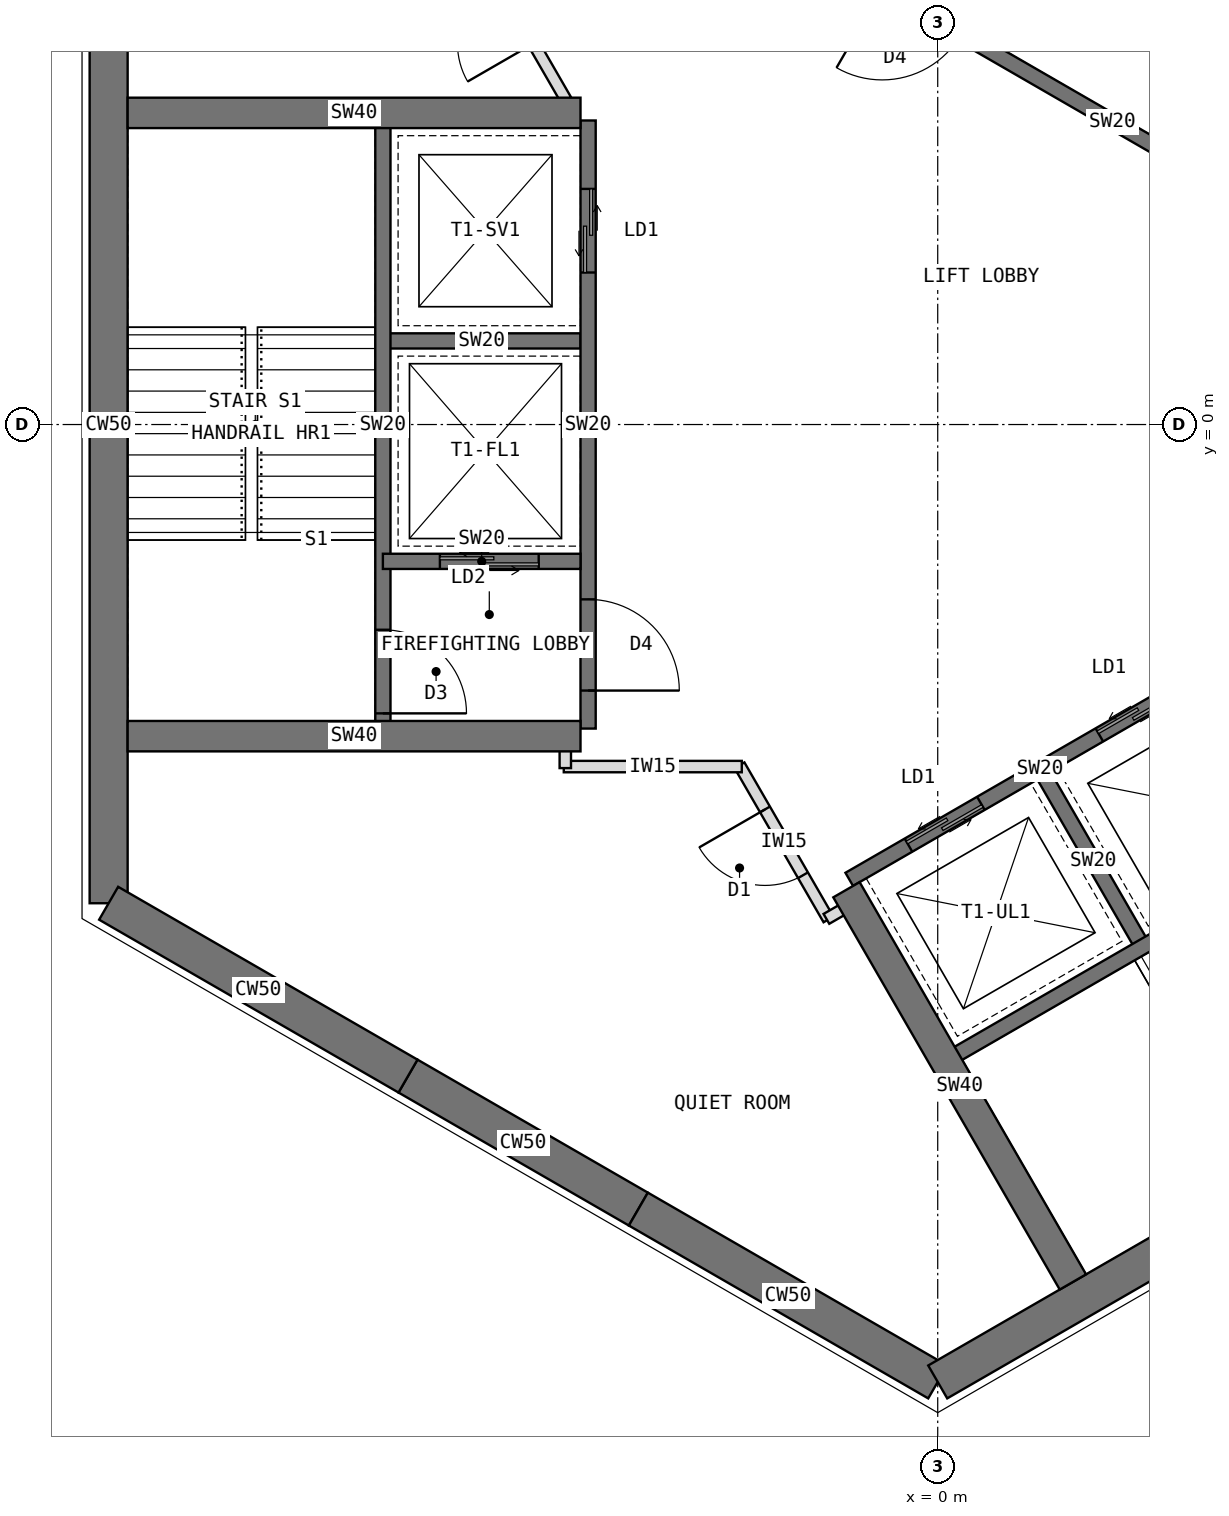
"""IFC4 building model, lengths in metres.
Left out: names, types, materials, properties, quantities, classifications, styles, units other than length and angle.
Written with IfcOpenShell. Run it as: python <this file> out.ifc"""

import sys

from ifc_helpers import new_model, si_unit, direction, frame, frame_2d, origin, place, context, subcontext, project, spatial, rectangle, extrude, element, fill, save


model = new_model("IFC4")
c1 = context("Model", 3, precision=1e-05, world=origin(), true_north=direction((0.0, 1.0)))
c2 = subcontext(c1, "Body", "Model", "MODEL_VIEW")
j1 = project(units=[si_unit("LENGTHUNIT", "METRE"), si_unit("PLANEANGLEUNIT", "RADIAN")], contexts=[c1])
p1 = place(None, origin())
s1 = spatial("IfcSite", under=j1, at=p1, CompositionType="ELEMENT")
p2 = place(p1, origin())
s2 = spatial("IfcBuilding", under=s1, at=p2, CompositionType="ELEMENT")
p3 = place(p2, frame((0.0, 0.0, 230.5)))
s3 = spatial("IfcBuildingStorey", under=s2, at=p3, CompositionType="ELEMENT", Elevation=230.5)
p4 = place(p3, frame((-10.908, 6.298, 0.0), z_axis=(0.0, 0.0, 1.0), x_axis=(0.0, -1.0, 0.0)))
e1 = element("IfcWall", 1, at=p4, inside=s3, PredefinedType="SHEAR", context=c2, shape_type="SweptSolid", body=[
    extrude(rectangle(XDim=12.596, YDim=0.5, at=frame_2d((6.298, 0.0))), origin(), (0.0, 0.0, 1.0), 4.0),
])
p5 = place(p3, frame((-10.908, -6.298, 0.0), z_axis=(0.0, 0.0, 1.0), x_axis=(0.866034513004, -0.499984222037, 0.0)))
e2 = element("IfcWall", 2, at=p5, inside=s3, PredefinedType="SHEAR", context=c2, shape_type="SweptSolid", body=[
    extrude(rectangle(XDim=4.548, YDim=0.5, at=frame_2d((2.274, 0.0))), origin(), (0.0, 0.0, 1.0), 4.0),
])
p6 = place(p3, frame((-6.97, -8.572, 0.0), z_axis=(0.0, 0.0, 1.0), x_axis=(0.866019471182, -0.500010275428, 0.0)))
e3 = element("IfcWall", 3, at=p6, inside=s3, PredefinedType="SHEAR", context=c2, shape_type="SweptSolid", body=[
    extrude(rectangle(XDim=3.5, YDim=0.5, at=frame_2d((1.75, 0.0))), origin(), (0.0, 0.0, 1.0), 4.0),
])
p7 = place(p3, frame((-3.939, -10.322, 0.0), z_axis=(0.0, 0.0, 1.0), x_axis=(0.866011268655, -0.500024481964, 0.0)))
e4 = element("IfcWall", 4, at=p7, inside=s3, PredefinedType="SHEAR", context=c2, shape_type="SweptSolid", body=[
    extrude(rectangle(XDim=4.548, YDim=0.5, at=frame_2d((2.274, 0.0))), origin(), (0.0, 0.0, 1.0), 4.0),
])
p8 = place(p3, frame((0.0, -12.596, 0.0), z_axis=(0.0, 0.0, 1.0), x_axis=(0.866021940709, 0.500005998175, 0.0)))
e5 = element("IfcWall", 5, at=p8, inside=s3, PredefinedType="SHEAR", context=c2, shape_type="SweptSolid", body=[
    extrude(rectangle(XDim=12.596, YDim=0.5, at=frame_2d((6.298, 0.0))), origin(), (0.0, 0.0, 1.0), 4.0),
])
p9 = place(p3, frame((5.764, 1.984, 0.0), z_axis=(0.0, 0.0, 1.0), x_axis=(-0.866026010844, 0.49999894854, 0.0)))
e6 = element("IfcWall", 6, at=p9, inside=s3, PredefinedType="SHEAR", context=c2, shape_type="SweptSolid", body=[
    extrude(rectangle(XDim=8.0, YDim=0.2, at=frame_2d((4.0, 0.0))), origin(), (0.0, 0.0, 1.0), 4.0),
])
p10 = place(p9, frame((6.3, 0.0, 0.0)))
e7 = element("IfcOpeningElement", 7, at=p10, cuts=e6, PredefinedType="OPENING", context=c2, shape_type="SweptSolid", body=[
    extrude(rectangle(XDim=1.2, YDim=2.1, at=frame_2d((0.6, 1.05))), frame((0.0, 0.11, 0.0), z_axis=(0.0, -1.0, 0.0), x_axis=(1.0, 0.0, 0.0)), (0.0, 0.0, 1.0), 0.22),
])
p11 = place(p3, frame((7.114, 4.322, 0.0), z_axis=(0.0, 0.0, 1.0), x_axis=(-0.866026010844, 0.49999894854, 0.0)))
e8 = element("IfcWall", 8, at=p11, inside=s3, PredefinedType="SHEAR", context=c2, shape_type="SweptSolid", body=[
    extrude(rectangle(XDim=8.0, YDim=0.2, at=frame_2d((4.0, 0.0))), origin(), (0.0, 0.0, 1.0), 4.0),
])
p12 = place(p11, frame((6.8, 0.0, 0.0)))
e9 = element("IfcOpeningElement", 9, at=p12, cuts=e8, PredefinedType="OPENING", context=c2, shape_type="SweptSolid", body=[
    extrude(rectangle(XDim=0.9, YDim=2.1, at=frame_2d((0.45, 1.05))), frame((0.0, 0.11, 0.0), z_axis=(0.0, -1.0, 0.0), x_axis=(1.0, 0.0, 0.0)), (0.0, 0.0, 1.0), 0.22),
])
p13 = place(p3, frame((-4.6, 4.0, 0.0), z_axis=(0.0, 0.0, 1.0), x_axis=(0.0, -1.0, 0.0)))
e10 = element("IfcWall", 10, at=p13, inside=s3, PredefinedType="SHEAR", context=c2, shape_type="SweptSolid", body=[
    extrude(rectangle(XDim=8.0, YDim=0.2, at=frame_2d((4.0, 0.0))), origin(), (0.0, 0.0, 1.0), 4.0),
])
p14 = place(p13, frame((6.3, 0.0, 0.0)))
e11 = element("IfcOpeningElement", 11, at=p14, cuts=e10, PredefinedType="OPENING", context=c2, shape_type="SweptSolid", body=[
    extrude(rectangle(XDim=1.2, YDim=2.1, at=frame_2d((0.6, 1.05))), frame((0.0, 0.11, 0.0), z_axis=(0.0, -1.0, 0.0), x_axis=(1.0, 0.0, 0.0)), (0.0, 0.0, 1.0), 0.22),
])
p15 = place(p13, frame((0.9, 0.0, 0.0)))
e12 = element("IfcOpeningElement", 12, at=p15, cuts=e10, PredefinedType="OPENING", context=c2, shape_type="SweptSolid", body=[
    extrude(rectangle(XDim=1.1, YDim=2.2, at=frame_2d((0.55, 1.1))), frame((0.0, 0.11, 0.0), z_axis=(0.0, -1.0, 0.0), x_axis=(1.0, 0.0, 0.0)), (0.0, 0.0, 1.0), 0.22),
])
p16 = place(p3, frame((-4.7, 1.1, 0.0), z_axis=(0.0, 0.0, 1.0), x_axis=(-1.0, 0.0, 0.0)))
e13 = element("IfcWall", 13, at=p16, inside=s3, PredefinedType="SHEAR", context=c2, shape_type="SweptSolid", body=[
    extrude(rectangle(XDim=2.6, YDim=0.2, at=frame_2d((1.3, 0.0))), origin(), (0.0, 0.0, 1.0), 4.0),
])
p17 = place(p3, frame((-4.7, -1.8, 0.0), z_axis=(0.0, 0.0, 1.0), x_axis=(-1.0, 0.0, 0.0)))
e14 = element("IfcWall", 14, at=p17, inside=s3, PredefinedType="SHEAR", context=c2, shape_type="SweptSolid", body=[
    extrude(rectangle(XDim=2.6, YDim=0.2, at=frame_2d((1.3, 0.0))), origin(), (0.0, 0.0, 1.0), 4.0),
])
p18 = place(p17, frame((0.55, 0.0, 0.0)))
e15 = element("IfcOpeningElement", 15, at=p18, cuts=e14, PredefinedType="OPENING", context=c2, shape_type="SweptSolid", body=[
    extrude(rectangle(XDim=1.3, YDim=2.2, at=frame_2d((0.65, 1.1))), frame((0.0, 0.11, 0.0), z_axis=(0.0, -1.0, 0.0), x_axis=(1.0, 0.0, 0.0)), (0.0, 0.0, 1.0), 0.22),
])
p19 = place(p3, frame((-7.3, 4.0, 0.0), z_axis=(0.0, 0.0, 1.0), x_axis=(0.0, -1.0, 0.0)))
e16 = element("IfcWall", 16, at=p19, inside=s3, PredefinedType="SHEAR", context=c2, shape_type="SweptSolid", body=[
    extrude(rectangle(XDim=8.0, YDim=0.2, at=frame_2d((4.0, 0.0))), origin(), (0.0, 0.0, 1.0), 4.0),
])
p20 = place(p19, frame((6.7, 0.0, 0.0)))
e17 = element("IfcOpeningElement", 17, at=p20, cuts=e16, PredefinedType="OPENING", context=c2, shape_type="SweptSolid", body=[
    extrude(rectangle(XDim=1.1, YDim=2.1, at=frame_2d((0.55, 1.05))), frame((0.0, 0.11, 0.0), z_axis=(0.0, -1.0, 0.0), x_axis=(1.0, 0.0, 0.0)), (0.0, 0.0, 1.0), 0.22),
])
for number, where, z_axis, x_axis in (
    (18, (-4.7, -4.1, 0.0), (0.0, 0.0, 1.0), (-1.0, 0.0, 0.0)),
    (19, (-4.7, 4.1, 0.0), (0.0, 0.0, 1.0), (-1.0, 0.0, 0.0)),
):
    element("IfcWall", number, at=place(p3, frame(where, z_axis=z_axis, x_axis=x_axis)), inside=s3, PredefinedType="SHEAR", context=c2, shape_type="SweptSolid", body=[
        extrude(rectangle(XDim=5.958, YDim=0.4, at=frame_2d((2.979, 0.0))), origin(), (0.0, 0.0, 1.0), 4.0),
    ])
p21 = place(p3, frame((-1.164, -5.984, 0.0), z_axis=(0.0, 0.0, 1.0), x_axis=(0.866026010844, 0.49999894854, 0.0)))
e20 = element("IfcWall", 20, at=p21, inside=s3, PredefinedType="SHEAR", context=c2, shape_type="SweptSolid", body=[
    extrude(rectangle(XDim=8.0, YDim=0.2, at=frame_2d((4.0, 0.0))), origin(), (0.0, 0.0, 1.0), 4.0),
])
p22 = place(p21, frame((6.3, 0.0, 0.0)))
e21 = element("IfcOpeningElement", 21, at=p22, cuts=e20, PredefinedType="OPENING", context=c2, shape_type="SweptSolid", body=[
    extrude(rectangle(XDim=1.2, YDim=2.1, at=frame_2d((0.6, 1.05))), frame((0.0, 0.11, 0.0), z_axis=(0.0, -1.0, 0.0), x_axis=(1.0, 0.0, 0.0)), (0.0, 0.0, 1.0), 0.22),
])
p23 = place(p21, frame((0.9, 0.0, 0.0)))
e22 = element("IfcOpeningElement", 22, at=p23, cuts=e20, PredefinedType="OPENING", context=c2, shape_type="SweptSolid", body=[
    extrude(rectangle(XDim=1.1, YDim=2.2, at=frame_2d((0.55, 1.1))), frame((0.0, 0.11, 0.0), z_axis=(0.0, -1.0, 0.0), x_axis=(1.0, 0.0, 0.0)), (0.0, 0.0, 1.0), 0.22),
])
p24 = place(p21, frame((3.8, 0.0, 0.0)))
e23 = element("IfcOpeningElement", 23, at=p24, cuts=e20, PredefinedType="OPENING", context=c2, shape_type="SweptSolid", body=[
    extrude(rectangle(XDim=1.1, YDim=2.2, at=frame_2d((0.55, 1.1))), frame((0.0, 0.11, 0.0), z_axis=(0.0, -1.0, 0.0), x_axis=(1.0, 0.0, 0.0)), (0.0, 0.0, 1.0), 0.22),
])
p25 = place(p3, frame((1.397, -4.62, 0.0), z_axis=(0.0, 0.0, 1.0), x_axis=(0.499936506574, -0.866062058628, 0.0)))
e24 = element("IfcWall", 24, at=p25, inside=s3, PredefinedType="SHEAR", context=c2, shape_type="SweptSolid", body=[
    extrude(rectangle(XDim=2.6, YDim=0.2, at=frame_2d((1.3, 0.0))), origin(), (0.0, 0.0, 1.0), 4.0),
])
p26 = place(p3, frame((0.186, -8.322, 0.0), z_axis=(0.0, 0.0, 1.0), x_axis=(0.866026010844, 0.49999894854, 0.0)))
e25 = element("IfcWall", 25, at=p26, inside=s3, PredefinedType="SHEAR", context=c2, shape_type="SweptSolid", body=[
    extrude(rectangle(XDim=8.0, YDim=0.2, at=frame_2d((4.0, 0.0))), origin(), (0.0, 0.0, 1.0), 4.0),
])
p27 = place(p26, frame((6.7, 0.0, 0.0)))
e26 = element("IfcOpeningElement", 26, at=p27, cuts=e25, PredefinedType="OPENING", context=c2, shape_type="SweptSolid", body=[
    extrude(rectangle(XDim=1.1, YDim=2.1, at=frame_2d((0.55, 1.05))), frame((0.0, 0.11, 0.0), z_axis=(0.0, -1.0, 0.0), x_axis=(1.0, 0.0, 0.0)), (0.0, 0.0, 1.0), 0.22),
])
p28 = place(p3, frame((-1.201, -6.12, 0.0), z_axis=(0.0, 0.0, 1.0), x_axis=(0.500021575205, -0.866012946976, 0.0)))
e27 = element("IfcWall", 27, at=p28, inside=s3, PredefinedType="SHEAR", context=c2, shape_type="SweptSolid", body=[
    extrude(rectangle(XDim=5.958, YDim=0.4, at=frame_2d((2.979, 0.0))), origin(), (0.0, 0.0, 1.0), 4.0),
])
p29 = place(p3, frame((-1.437, -6.511, 0.0), z_axis=(0.0, 0.0, 1.0), x_axis=(-0.500074377092, 0.865982457891, 0.0)))
e28 = element("IfcWall", 28, at=p29, inside=s3, PredefinedType="PARTITIONING", context=c2, shape_type="SweptSolid", body=[
    extrude(rectangle(XDim=2.342, YDim=0.15, at=frame_2d((1.171, 0.0))), origin(), (0.0, 0.0, 1.0), 3.8),
])
p30 = place(p29, frame((0.671, 0.0, 0.0)))
e29 = element("IfcOpeningElement", 29, at=p30, cuts=e28, PredefinedType="OPENING", context=c2, shape_type="SweptSolid", body=[
    extrude(rectangle(XDim=1.0, YDim=2.1, at=frame_2d((0.5, 1.05))), frame((0.0, 0.085, 0.0), z_axis=(0.0, -1.0, 0.0), x_axis=(1.0, 0.0, 0.0)), (0.0, 0.0, 1.0), 0.17),
])
p31 = place(p3, frame((-2.578, -4.5, 0.0), z_axis=(0.0, 0.0, 1.0), x_axis=(-1.0, 0.0, 0.0)))
e30 = element("IfcWall", 30, at=p31, inside=s3, PredefinedType="PARTITIONING", context=c2, shape_type="SweptSolid", body=[
    extrude(rectangle(XDim=2.342, YDim=0.15, at=frame_2d((1.171, 0.0))), origin(), (0.0, 0.0, 1.0), 3.8),
])
p32 = place(p3, frame((-4.9, -4.52, 0.0), z_axis=(0.0, 0.0, 1.0), x_axis=(0.0, 1.0, 0.0)))
e31 = element("IfcWall", 31, at=p32, inside=s3, PredefinedType="PARTITIONING", context=c2, shape_type="SweptSolid", body=[
    extrude(rectangle(XDim=0.43, YDim=0.15, at=frame_2d((0.215, 0.0))), origin(), (0.0, 0.0, 1.0), 3.8),
])
p33 = place(p3, frame((-4.89, 4.27, 0.0), z_axis=(0.0, 0.0, 1.0), x_axis=(-0.500032211057, 0.866006805923, 0.0)))
e32 = element("IfcWall", 32, at=p33, inside=s3, PredefinedType="PARTITIONING", context=c2, shape_type="SweptSolid", body=[
    extrude(rectangle(XDim=4.526, YDim=0.15, at=frame_2d((2.263, 0.0))), origin(), (0.0, 0.0, 1.0), 3.8),
])
p34 = place(p33, frame((0.858, 0.0, 0.0)))
e33 = element("IfcOpeningElement", 33, at=p34, cuts=e32, PredefinedType="OPENING", context=c2, shape_type="SweptSolid", body=[
    extrude(rectangle(XDim=1.0, YDim=2.1, at=frame_2d((0.5, 1.05))), frame((0.0, 0.085, 0.0), z_axis=(0.0, -1.0, 0.0), x_axis=(1.0, 0.0, 0.0)), (0.0, 0.0, 1.0), 0.17),
])
p35 = place(p3, frame((-1.092, -6.289, 0.0), z_axis=(0.0, 0.0, 1.0), x_axis=(-0.866138304741, -0.499804398801, 0.0)))
e34 = element("IfcWall", 34, at=p35, inside=s3, PredefinedType="PARTITIONING", context=c2, shape_type="SweptSolid", body=[
    extrude(rectangle(XDim=0.43, YDim=0.15, at=frame_2d((0.215, 0.0))), origin(), (0.0, 0.0, 1.0), 3.8),
])
p36 = place(p14, origin())
e35 = element("IfcDoor", 35, at=p36, inside=s3, OperationType="SINGLE_SWING_RIGHT", PredefinedType="DOOR", context=c2, shape_type="SweptSolid", body=[
    extrude(rectangle(XDim=1.2, YDim=2.1, at=frame_2d((0.6, 1.05))), frame((0.0, 0.025, 0.0), z_axis=(0.0, -1.0, 0.0), x_axis=(1.0, 0.0, 0.0)), (0.0, 0.0, 1.0), 0.05),
])
fill(e11, e35)
p37 = place(p18, origin())
e36 = element("IfcDoor", 36, at=p37, inside=s3, OperationType="DOUBLE_DOOR_SLIDING", PredefinedType="DOOR", context=c2, shape_type="SweptSolid", body=[
    extrude(rectangle(XDim=1.3, YDim=2.2, at=frame_2d((0.65, 1.1))), frame((0.0, 0.025, 0.0), z_axis=(0.0, -1.0, 0.0), x_axis=(1.0, 0.0, 0.0)), (0.0, 0.0, 1.0), 0.05),
])
fill(e15, e36)
p38 = place(p15, origin())
e37 = element("IfcDoor", 37, at=p38, inside=s3, OperationType="DOUBLE_DOOR_SLIDING", PredefinedType="DOOR", context=c2, shape_type="SweptSolid", body=[
    extrude(rectangle(XDim=1.1, YDim=2.2, at=frame_2d((0.55, 1.1))), frame((0.0, 0.025, 0.0), z_axis=(0.0, -1.0, 0.0), x_axis=(1.0, 0.0, 0.0)), (0.0, 0.0, 1.0), 0.05),
])
fill(e12, e37)
p39 = place(p20, origin())
e38 = element("IfcDoor", 38, at=p39, inside=s3, OperationType="SINGLE_SWING_RIGHT", PredefinedType="DOOR", context=c2, shape_type="SweptSolid", body=[
    extrude(rectangle(XDim=1.1, YDim=2.1, at=frame_2d((0.55, 1.05))), frame((0.0, 0.025, 0.0), z_axis=(0.0, -1.0, 0.0), x_axis=(1.0, 0.0, 0.0)), (0.0, 0.0, 1.0), 0.05),
])
fill(e17, e38)
p40 = place(p23, origin())
e39 = element("IfcDoor", 39, at=p40, inside=s3, OperationType="DOUBLE_DOOR_SLIDING", PredefinedType="DOOR", context=c2, shape_type="SweptSolid", body=[
    extrude(rectangle(XDim=1.1, YDim=2.2, at=frame_2d((0.55, 1.1))), frame((0.0, 0.025, 0.0), z_axis=(0.0, -1.0, 0.0), x_axis=(1.0, 0.0, 0.0)), (0.0, 0.0, 1.0), 0.05),
])
fill(e22, e39)
p41 = place(p24, origin())
e40 = element("IfcDoor", 40, at=p41, inside=s3, OperationType="DOUBLE_DOOR_SLIDING", PredefinedType="DOOR", context=c2, shape_type="SweptSolid", body=[
    extrude(rectangle(XDim=1.1, YDim=2.2, at=frame_2d((0.55, 1.1))), frame((0.0, 0.025, 0.0), z_axis=(0.0, -1.0, 0.0), x_axis=(1.0, 0.0, 0.0)), (0.0, 0.0, 1.0), 0.05),
])
fill(e23, e40)
p42 = place(p30, origin())
e41 = element("IfcDoor", 41, at=p42, inside=s3, OperationType="SINGLE_SWING_RIGHT", PredefinedType="DOOR", context=c2, shape_type="SweptSolid", body=[
    extrude(rectangle(XDim=1.0, YDim=2.1, at=frame_2d((0.5, 1.05))), frame((0.0, 0.025, 0.0), z_axis=(0.0, -1.0, 0.0), x_axis=(1.0, 0.0, 0.0)), (0.0, 0.0, 1.0), 0.05),
])
fill(e29, e41)
save(model, sys.argv[1])
